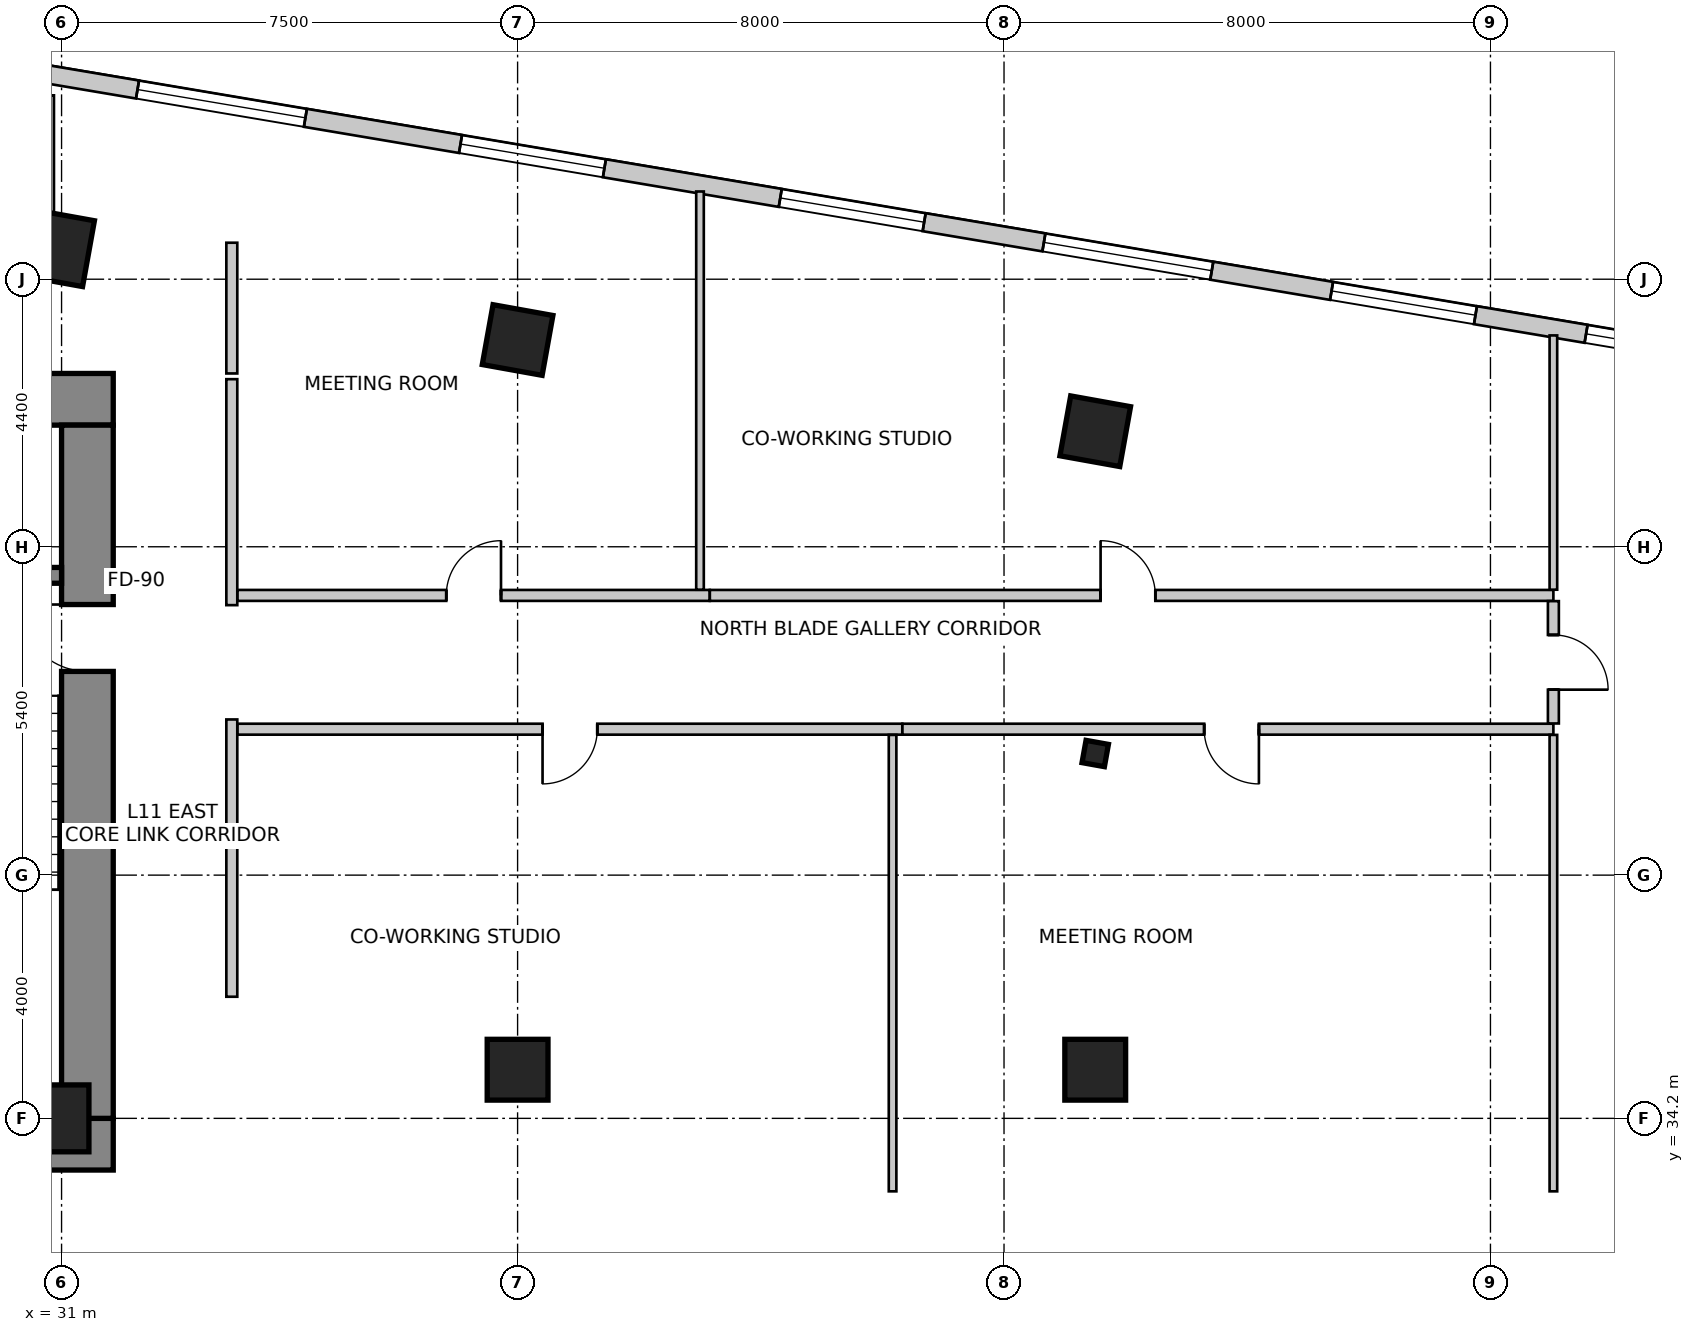
"""IFC4 building model, lengths in metres.
Left out: names, types, materials, properties, quantities, classifications, styles, units other than length and angle.
Written with IfcOpenShell. Run it as: python <this file> out.ifc"""

import sys

from ifc_helpers import new_model, si_unit, direction, frame, frame_2d, origin, origin_2d, place, context, subcontext, project, spatial, rectangle, i_section, extrude, source, transform, mapped, element, fill, save


model = new_model("IFC4")
c1 = context("Model", 3, precision=1e-05, world=origin(), true_north=direction((0.0, 1.0)))
c2 = subcontext(c1, "Body", "Model", "MODEL_VIEW")
j1 = project(units=[si_unit("LENGTHUNIT", "METRE"), si_unit("PLANEANGLEUNIT", "RADIAN")], contexts=[c1])
p1 = place(None, origin())
s1 = spatial("IfcSite", under=j1, at=p1, CompositionType="ELEMENT")
p2 = place(p1, origin())
s2 = spatial("IfcBuilding", under=s1, at=p2, CompositionType="ELEMENT")
p3 = place(p2, frame((0.0, 0.0, 47.0)))
s3 = spatial("IfcBuildingStorey", under=s2, at=p3, CompositionType="ELEMENT", Elevation=47.0)
p4 = place(p3, frame((15.75, 46.025, 0.0), z_axis=(0.0, 0.0, 1.0), x_axis=(1.0, 0.0, 0.0)))
e1 = element("IfcWall", 1, at=p4, inside=s3, PredefinedType="SHEAR", context=c2, shape_type="SweptSolid", body=[
    extrude(rectangle(XDim=16.1, YDim=0.85, at=frame_2d((8.05, 0.0))), origin(), (0.0, 0.0, 1.0), 4.0),
])
p5 = place(p3, frame((15.75, 33.775, 0.0), z_axis=(0.0, 0.0, 1.0), x_axis=(1.0, 0.0, 0.0)))
e2 = element("IfcWall", 2, at=p5, inside=s3, PredefinedType="SHEAR", context=c2, shape_type="SweptSolid", body=[
    extrude(rectangle(XDim=16.1, YDim=0.85, at=frame_2d((8.05, 0.0))), origin(), (0.0, 0.0, 1.0), 4.0),
])
m1 = source(origin(), c2, "Body", "SweptSolid", [
    extrude(rectangle(XDim=1.3, YDim=2.15, at=frame_2d((0.65, 1.075))), frame((0.0, 0.435, 0.0), z_axis=(0.0, -1.0, 0.0), x_axis=(1.0, 0.0, 0.0)), (0.0, 0.0, 1.0), 0.87),
])
p6 = place(p5, frame((10.18, 0.0, 0.0)))
e3 = element("IfcOpeningElement", 3, at=p6, cuts=e2, PredefinedType="OPENING", context=c2, shape_type="MappedRepresentation", body=[
    mapped(m1, transform((0.0, 0.0, 0.0), scale=1.0)),
])
p7 = place(p3, frame((31.425, 34.2, 0.0), z_axis=(0.0, 0.0, 1.0), x_axis=(0.0, 1.0, 0.0)))
e4 = element("IfcWall", 4, at=p7, inside=s3, PredefinedType="SHEAR", context=c2, shape_type="SweptSolid", body=[
    extrude(rectangle(XDim=11.4, YDim=0.85, at=frame_2d((5.7, 0.0))), origin(), (0.0, 0.0, 1.0), 4.0),
])
m2 = source(origin(), c2, "Body", "SweptSolid", [
    extrude(rectangle(XDim=1.1, YDim=2.15, at=frame_2d((0.55, 1.075))), frame((0.0, 0.435, 0.0), z_axis=(0.0, -1.0, 0.0), x_axis=(1.0, 0.0, 0.0)), (0.0, 0.0, 1.0), 0.87),
])
p8 = place(p7, frame((7.35, 0.0, 0.0)))
e5 = element("IfcOpeningElement", 5, at=p8, cuts=e4, PredefinedType="OPENING", context=c2, shape_type="MappedRepresentation", body=[
    mapped(m2, transform((0.0, 0.0, 0.0), scale=1.0)),
])
p9 = place(p3, frame((27.5, 43.13, 0.0), z_axis=(0.0, 0.0, 1.0), x_axis=(1.0, 0.0, 0.0)))
e6 = element("IfcWall", 6, at=p9, inside=s3, PredefinedType="SHEAR", context=c2, shape_type="SweptSolid", body=[
    extrude(rectangle(XDim=3.5, YDim=0.26, at=frame_2d((1.75, 0.0))), origin(), (0.0, 0.0, 1.0), 4.0),
])
m3 = source(origin(), c2, "Body", "SweptSolid", [
    extrude(rectangle(XDim=0.9, YDim=1.1, at=origin_2d()), origin(), (0.0, 0.0, 1.0), 4.0),
])
p10 = place(p3, frame((31.0, 48.5, 0.0), z_axis=(0.0, 0.0, 1.0), x_axis=(0.984195607969, -0.17708474032, 0.0)))
e7 = element("IfcColumn", 7, at=p10, inside=s3, PredefinedType="COLUMN", context=c2, shape_type="MappedRepresentation", body=[
    mapped(m3, transform((0.0, 0.0, 0.0), scale=1.0)),
])
m4 = source(origin(), c2, "Body", "SweptSolid", [
    extrude(rectangle(XDim=1.0, YDim=1.0, at=origin_2d()), origin(), (0.0, 0.0, 1.0), 4.0),
])
for number, where, z_axis, x_axis in (
    (8, (38.5, 47.0, 0.0), (0.0, 0.0, 1.0), (0.984, -0.177, 0.0)),
    (9, (48.0, 45.5, 0.0), (0.0, 0.0, 1.0), (0.984, -0.177, 0.0)),
):
    element("IfcColumn", number, at=place(p3, frame(where, z_axis=z_axis, x_axis=x_axis)), inside=s3, PredefinedType="COLUMN", context=c2, shape_type="MappedRepresentation", body=[
        mapped(m4, transform((0.0, 0.0, 0.0), scale=1.0)),
    ])
p11 = place(p3, frame((31.0, 34.2, 0.0), z_axis=(0.0, 0.0, 1.0), x_axis=(1.0, 0.0, 0.0)))
e10 = element("IfcColumn", 10, at=p11, inside=s3, PredefinedType="COLUMN", context=c2, shape_type="MappedRepresentation", body=[
    mapped(m3, transform((0.0, 0.0, 0.0), scale=1.0)),
])
for number, where, z_axis, x_axis in (
    (11, (38.5, 35.0, 0.0), (0.0, 0.0, 1.0), (1.0, 0.0, 0.0)),
    (12, (48.0, 35.0, 0.0), (0.0, 0.0, 1.0), (1.0, 0.0, 0.0)),
):
    element("IfcColumn", number, at=place(p3, frame(where, z_axis=z_axis, x_axis=x_axis)), inside=s3, PredefinedType="COLUMN", context=c2, shape_type="MappedRepresentation", body=[
        mapped(m4, transform((0.0, 0.0, 0.0), scale=1.0)),
    ])
m5 = source(origin(), c2, "Body", "SweptSolid", [
    extrude(i_section(OverallWidth=0.374, OverallDepth=0.372, WebThickness=0.016, FlangeThickness=0.026, FilletRadius=0.015, at=origin_2d()), origin(), (0.0, 0.0, 1.0), 4.0),
])
p12 = place(p3, frame((48.0, 40.2, 0.0), z_axis=(0.0, 0.0, 1.0), x_axis=(0.984195607969, -0.17708474032, 0.0)))
e13 = element("IfcColumn", 13, at=p12, inside=s3, PredefinedType="COLUMN", context=c2, shape_type="MappedRepresentation", body=[
    mapped(m5, transform((0.0, 0.0, 0.0), scale=1.0)),
])
p13 = place(p3, frame((58.761, 46.648, 0.0), z_axis=(0.0, 0.0, 1.0), x_axis=(-0.98607502735, 0.166301053624, 0.0)))
e14 = element("IfcWall", 14, at=p13, inside=s3, PredefinedType="SOLIDWALL", context=c2, shape_type="SweptSolid", body=[
    extrude(rectangle(XDim=37.397, YDim=0.3, at=frame_2d((18.699, 0.0))), origin(), (0.0, 0.0, 1.0), 3.75),
])
m6 = source(origin(), c2, "Body", "SweptSolid", [
    extrude(rectangle(XDim=2.1, YDim=2.0, at=frame_2d((1.05, 1.0))), frame((0.0, 0.16, 0.0), z_axis=(0.0, -1.0, 0.0), x_axis=(1.0, 0.0, 0.0)), (0.0, 0.0, 1.0), 0.32),
])
p14 = place(p13, frame((0.626, 0.0, 0.85)))
e15 = element("IfcOpeningElement", 15, at=p14, cuts=e14, PredefinedType="OPENING", context=c2, shape_type="MappedRepresentation", body=[
    mapped(m6, transform((0.0, 0.0, 0.0), scale=1.0)),
])
m7 = source(origin(), c2, "Body", "SweptSolid", [
    extrude(rectangle(XDim=2.4, YDim=2.2, at=frame_2d((1.2, 1.1))), frame((0.0, 0.16, 0.0), z_axis=(0.0, -1.0, 0.0), x_axis=(1.0, 0.0, 0.0)), (0.0, 0.0, 1.0), 0.32),
])
p15 = place(p13, frame((4.571, 0.0, 0.85)))
e16 = element("IfcOpeningElement", 16, at=p15, cuts=e14, PredefinedType="OPENING", context=c2, shape_type="MappedRepresentation", body=[
    mapped(m7, transform((0.0, 0.0, 0.0), scale=1.0)),
])
m8 = source(origin(), c2, "Body", "SweptSolid", [
    extrude(rectangle(XDim=2.8, YDim=2.4, at=frame_2d((1.4, 1.2))), frame((0.0, 0.16, 0.0), z_axis=(0.0, -1.0, 0.0), x_axis=(1.0, 0.0, 0.0)), (0.0, 0.0, 1.0), 0.32),
])
p16 = place(p13, frame((8.969, 0.0, 0.85)))
e17 = element("IfcOpeningElement", 17, at=p16, cuts=e14, PredefinedType="OPENING", context=c2, shape_type="MappedRepresentation", body=[
    mapped(m8, transform((0.0, 0.0, 0.0), scale=1.0)),
])
p17 = place(p13, frame((13.766, 0.0, 0.85)))
e18 = element("IfcOpeningElement", 18, at=p17, cuts=e14, PredefinedType="OPENING", context=c2, shape_type="MappedRepresentation", body=[
    mapped(m7, transform((0.0, 0.0, 0.0), scale=1.0)),
])
p18 = place(p13, frame((19.099, 0.0, 0.85)))
e19 = element("IfcOpeningElement", 19, at=p18, cuts=e14, PredefinedType="OPENING", context=c2, shape_type="MappedRepresentation", body=[
    mapped(m7, transform((0.0, 0.0, 0.0), scale=1.0)),
])
p19 = place(p13, frame((24.086, 0.0, 0.85)))
e20 = element("IfcOpeningElement", 20, at=p19, cuts=e14, PredefinedType="OPENING", context=c2, shape_type="MappedRepresentation", body=[
    mapped(m8, transform((0.0, 0.0, 0.0), scale=1.0)),
])
p20 = place(p13, frame((29.957, 0.0, 0.85)))
e21 = element("IfcOpeningElement", 21, at=p20, cuts=e14, PredefinedType="OPENING", context=c2, shape_type="MappedRepresentation", body=[
    mapped(m7, transform((0.0, 0.0, 0.0), scale=1.0)),
])
p21 = place(p13, frame((34.456, 0.0, 0.85)))
e22 = element("IfcOpeningElement", 22, at=p21, cuts=e14, PredefinedType="OPENING", context=c2, shape_type="MappedRepresentation", body=[
    mapped(m7, transform((0.0, 0.0, 0.0), scale=1.0)),
])
p22 = place(p3, frame((25.362, 48.6, 0.0), z_axis=(0.0, 0.0, 1.0), x_axis=(1.0, 0.0, 0.0)))
e23 = element("IfcWall", 23, at=p22, inside=s3, PredefinedType="PARTITIONING", context=c2, shape_type="SweptSolid", body=[
    extrude(rectangle(XDim=5.598, YDim=0.18, at=frame_2d((2.799, 0.0))), origin(), (0.0, 0.0, 1.0), 2.892),
])
m9 = source(origin(), c2, "Body", "SweptSolid", [
    extrude(rectangle(XDim=0.9, YDim=2.15, at=frame_2d((0.45, 1.075))), frame((0.0, 0.1, 0.0), z_axis=(0.0, -1.0, 0.0), x_axis=(1.0, 0.0, 0.0)), (0.0, 0.0, 1.0), 0.2),
])
p23 = place(p22, frame((2.349, 0.0, 0.0)))
e24 = element("IfcOpeningElement", 24, at=p23, cuts=e23, PredefinedType="OPENING", context=c2, shape_type="MappedRepresentation", body=[
    mapped(m9, transform((0.0, 0.0, 0.0), scale=1.0)),
])
p24 = place(p3, frame((33.8, 48.6, 0.0), z_axis=(0.0, 0.0, 1.0), x_axis=(0.0, -1.0, 0.0)))
e25 = element("IfcWall", 25, at=p24, inside=s3, PredefinedType="PARTITIONING", context=c2, shape_type="SweptSolid", body=[
    extrude(rectangle(XDim=2.15, YDim=0.18, at=frame_2d((1.075, 0.0))), origin(), (0.0, 0.0, 1.0), 2.892),
])
p25 = place(p3, frame((33.8, 40.76, 0.0), z_axis=(0.0, 0.0, 1.0), x_axis=(0.0, -1.0, 0.0)))
e26 = element("IfcWall", 26, at=p25, inside=s3, PredefinedType="PARTITIONING", context=c2, shape_type="SweptSolid", body=[
    extrude(rectangle(XDim=4.56, YDim=0.18, at=frame_2d((2.28, 0.0))), origin(), (0.0, 0.0, 1.0), 3.75),
])
p26 = place(p3, frame((33.8, 46.356, 0.0), z_axis=(0.0, 0.0, 1.0), x_axis=(0.0, -1.0, 0.0)))
e27 = element("IfcWall", 27, at=p26, inside=s3, PredefinedType="PARTITIONING", context=c2, shape_type="SweptSolid", body=[
    extrude(rectangle(XDim=3.716, YDim=0.18, at=frame_2d((1.858, 0.0))), origin(), (0.0, 0.0, 1.0), 3.322),
])
p27 = place(p3, frame((44.827, 40.6, 0.0), z_axis=(0.0, 0.0, 1.0), x_axis=(-1.0, 0.0, 0.0)))
e28 = element("IfcWall", 28, at=p27, inside=s3, PredefinedType="PARTITIONING", context=c2, shape_type="SweptSolid", body=[
    extrude(rectangle(XDim=10.933, YDim=0.18, at=frame_2d((5.466, 0.0))), origin(), (0.0, 0.0, 1.0), 3.125),
])
p28 = place(p27, frame((5.017, 0.0, 0.0)))
e29 = element("IfcOpeningElement", 29, at=p28, cuts=e28, PredefinedType="OPENING", context=c2, shape_type="MappedRepresentation", body=[
    mapped(m9, transform((0.0, 0.0, 0.0), scale=1.0)),
])
p29 = place(p3, frame((55.535, 40.6, 0.0), z_axis=(0.0, 0.0, 1.0), x_axis=(-1.0, 0.0, 0.0)))
e30 = element("IfcWall", 30, at=p29, inside=s3, PredefinedType="PARTITIONING", context=c2, shape_type="SweptSolid", body=[
    extrude(rectangle(XDim=10.706, YDim=0.18, at=frame_2d((5.353, 0.0))), origin(), (0.0, 0.0, 1.0), 3.125),
])
p30 = place(p29, frame((4.843, 0.0, 0.0)))
e31 = element("IfcOpeningElement", 31, at=p30, cuts=e30, PredefinedType="OPENING", context=c2, shape_type="MappedRepresentation", body=[
    mapped(m9, transform((0.0, 0.0, 0.0), scale=1.0)),
])
p31 = place(p3, frame((33.894, 42.8, 0.0), z_axis=(0.0, 0.0, 1.0), x_axis=(1.0, 0.0, 0.0)))
e32 = element("IfcWall", 32, at=p31, inside=s3, PredefinedType="PARTITIONING", context=c2, shape_type="SweptSolid", body=[
    extrude(rectangle(XDim=7.766, YDim=0.18, at=frame_2d((3.883, 0.0))), origin(), (0.0, 0.0, 1.0), 3.125),
])
p32 = place(p31, frame((3.433, 0.0, 0.0)))
e33 = element("IfcOpeningElement", 33, at=p32, cuts=e32, PredefinedType="OPENING", context=c2, shape_type="MappedRepresentation", body=[
    mapped(m9, transform((0.0, 0.0, 0.0), scale=1.0)),
])
p33 = place(p3, frame((41.662, 42.8, 0.0), z_axis=(0.0, 0.0, 1.0), x_axis=(1.0, 0.0, 0.0)))
e34 = element("IfcWall", 34, at=p33, inside=s3, PredefinedType="PARTITIONING", context=c2, shape_type="SweptSolid", body=[
    extrude(rectangle(XDim=13.873, YDim=0.18, at=frame_2d((6.937, 0.0))), origin(), (0.0, 0.0, 1.0), 3.125),
])
p34 = place(p33, frame((6.426, 0.0, 0.0)))
e35 = element("IfcOpeningElement", 35, at=p34, cuts=e34, PredefinedType="OPENING", context=c2, shape_type="MappedRepresentation", body=[
    mapped(m9, transform((0.0, 0.0, 0.0), scale=1.0)),
])
p35 = place(p3, frame((55.535, 42.706, 0.0), z_axis=(0.0, 0.0, 1.0), x_axis=(0.0, -1.0, 0.0)))
e36 = element("IfcWall", 36, at=p35, inside=s3, PredefinedType="PARTITIONING", context=c2, shape_type="SweptSolid", body=[
    extrude(rectangle(XDim=2.012, YDim=0.18, at=frame_2d((1.006, 0.0))), origin(), (0.0, 0.0, 1.0), 3.75),
])
p36 = place(p35, frame((0.556, 0.0, 0.0)))
e37 = element("IfcOpeningElement", 37, at=p36, cuts=e36, PredefinedType="OPENING", context=c2, shape_type="MappedRepresentation", body=[
    mapped(m9, transform((0.0, 0.0, 0.0), scale=1.0)),
])
p37 = place(p3, frame((44.667, 40.506, 0.0), z_axis=(0.0, 0.0, 1.0), x_axis=(0.0, -1.0, 0.0)))
e38 = element("IfcWall", 38, at=p37, inside=s3, PredefinedType="PARTITIONING", context=c2, shape_type="SweptSolid", body=[
    extrude(rectangle(XDim=7.506, YDim=0.125, at=frame_2d((3.753, 0.0))), origin(), (0.0, 0.0, 1.0), 2.892),
])
p38 = place(p3, frame((55.535, 40.506, 0.0), z_axis=(0.0, 0.0, 1.0), x_axis=(0.0, -1.0, 0.0)))
e39 = element("IfcWall", 39, at=p38, inside=s3, PredefinedType="PARTITIONING", context=c2, shape_type="SweptSolid", body=[
    extrude(rectangle(XDim=7.506, YDim=0.125, at=frame_2d((3.753, 0.0))), origin(), (0.0, 0.0, 1.0), 3.75),
])
p39 = place(p3, frame((41.5, 49.443, 0.0), z_axis=(0.0, 0.0, 1.0), x_axis=(0.0, -1.0, 0.0)))
e40 = element("IfcWall", 40, at=p39, inside=s3, PredefinedType="PARTITIONING", context=c2, shape_type="SweptSolid", body=[
    extrude(rectangle(XDim=6.549, YDim=0.125, at=frame_2d((3.274, 0.0))), origin(), (0.0, 0.0, 1.0), 2.892),
])
p40 = place(p3, frame((55.535, 47.076, 0.0), z_axis=(0.0, 0.0, 1.0), x_axis=(0.0, -1.0, 0.0)))
e41 = element("IfcWall", 41, at=p40, inside=s3, PredefinedType="PARTITIONING", context=c2, shape_type="SweptSolid", body=[
    extrude(rectangle(XDim=4.182, YDim=0.125, at=frame_2d((2.091, 0.0))), origin(), (0.0, 0.0, 1.0), 3.75),
])
p41 = place(p3, frame((30.8, 51.024, 0.0), z_axis=(0.0, 0.0, 1.0), x_axis=(0.0, -1.0, 0.0)))
e42 = element("IfcWall", 42, at=p41, inside=s3, PredefinedType="PARTITIONING", context=c2, shape_type="SweptSolid", body=[
    extrude(rectangle(XDim=2.204, YDim=0.15, at=frame_2d((1.102, 0.0))), origin(), (0.0, 0.0, 1.0), 3.75),
])
m10 = source(origin(), c2, "Body", "SweptSolid", [
    extrude(rectangle(XDim=2.1, YDim=2.0, at=frame_2d((1.05, 1.0))), frame((0.0, -0.015, 0.0), z_axis=(0.0, -1.0, 0.0), x_axis=(1.0, 0.0, 0.0)), (0.0, 0.0, 1.0), 0.06),
])
p42 = place(p14, origin())
e43 = element("IfcWindow", 43, at=p42, inside=s3, PartitioningType="SINGLE_PANEL", PredefinedType="WINDOW", context=c2, shape_type="MappedRepresentation", body=[
    mapped(m10, transform((0.0, 0.0, 0.0), scale=1.0)),
])
fill(e15, e43)
m11 = source(origin(), c2, "Body", "SweptSolid", [
    extrude(rectangle(XDim=2.4, YDim=2.2, at=frame_2d((1.2, 1.1))), frame((0.0, -0.015, 0.0), z_axis=(0.0, -1.0, 0.0), x_axis=(1.0, 0.0, 0.0)), (0.0, 0.0, 1.0), 0.06),
])
p43 = place(p15, origin())
e44 = element("IfcWindow", 44, at=p43, inside=s3, PartitioningType="SINGLE_PANEL", PredefinedType="WINDOW", context=c2, shape_type="MappedRepresentation", body=[
    mapped(m11, transform((0.0, 0.0, 0.0), scale=1.0)),
])
fill(e16, e44)
m12 = source(origin(), c2, "Body", "SweptSolid", [
    extrude(rectangle(XDim=2.8, YDim=2.4, at=frame_2d((1.4, 1.2))), frame((0.0, -0.015, 0.0), z_axis=(0.0, -1.0, 0.0), x_axis=(1.0, 0.0, 0.0)), (0.0, 0.0, 1.0), 0.06),
])
p44 = place(p16, origin())
e45 = element("IfcWindow", 45, at=p44, inside=s3, PartitioningType="SINGLE_PANEL", PredefinedType="WINDOW", context=c2, shape_type="MappedRepresentation", body=[
    mapped(m12, transform((0.0, 0.0, 0.0), scale=1.0)),
])
fill(e17, e45)
p45 = place(p17, origin())
e46 = element("IfcWindow", 46, at=p45, inside=s3, PartitioningType="SINGLE_PANEL", PredefinedType="WINDOW", context=c2, shape_type="MappedRepresentation", body=[
    mapped(m11, transform((0.0, 0.0, 0.0), scale=1.0)),
])
fill(e18, e46)
p46 = place(p18, origin())
e47 = element("IfcWindow", 47, at=p46, inside=s3, PartitioningType="SINGLE_PANEL", PredefinedType="WINDOW", context=c2, shape_type="MappedRepresentation", body=[
    mapped(m11, transform((0.0, 0.0, 0.0), scale=1.0)),
])
fill(e19, e47)
p47 = place(p19, origin())
e48 = element("IfcWindow", 48, at=p47, inside=s3, PartitioningType="SINGLE_PANEL", PredefinedType="WINDOW", context=c2, shape_type="MappedRepresentation", body=[
    mapped(m12, transform((0.0, 0.0, 0.0), scale=1.0)),
])
fill(e20, e48)
m13 = source(origin(), c2, "Body", "SweptSolid", [
    extrude(rectangle(XDim=1.1, YDim=2.15, at=frame_2d((0.55, 1.075))), frame((0.0, 0.025, 0.0), z_axis=(0.0, -1.0, 0.0), x_axis=(1.0, 0.0, 0.0)), (0.0, 0.0, 1.0), 0.05),
])
p48 = place(p8, origin())
e49 = element("IfcDoor", 49, at=p48, inside=s3, OperationType="SINGLE_SWING_RIGHT", PredefinedType="DOOR", context=c2, shape_type="MappedRepresentation", body=[
    mapped(m13, transform((0.0, 0.0, 0.0), scale=1.0)),
])
fill(e5, e49)
m14 = source(origin(), c2, "Body", "SweptSolid", [
    extrude(rectangle(XDim=0.9, YDim=2.15, at=frame_2d((0.45, 1.075))), frame((0.0, 0.025, 0.0), z_axis=(0.0, -1.0, 0.0), x_axis=(1.0, 0.0, 0.0)), (0.0, 0.0, 1.0), 0.05),
])
p49 = place(p28, origin())
e50 = element("IfcDoor", 50, at=p49, inside=s3, OperationType="SINGLE_SWING_RIGHT", PredefinedType="DOOR", context=c2, shape_type="MappedRepresentation", body=[
    mapped(m14, transform((0.0, 0.0, 0.0), scale=1.0)),
])
fill(e29, e50)
p50 = place(p30, origin())
e51 = element("IfcDoor", 51, at=p50, inside=s3, OperationType="SINGLE_SWING_LEFT", PredefinedType="DOOR", context=c2, shape_type="MappedRepresentation", body=[
    mapped(m14, transform((0.0, 0.0, 0.0), scale=1.0)),
])
fill(e31, e51)
p51 = place(p32, origin())
e52 = element("IfcDoor", 52, at=p51, inside=s3, OperationType="SINGLE_SWING_RIGHT", PredefinedType="DOOR", context=c2, shape_type="MappedRepresentation", body=[
    mapped(m14, transform((0.0, 0.0, 0.0), scale=1.0)),
])
fill(e33, e52)
p52 = place(p34, origin())
e53 = element("IfcDoor", 53, at=p52, inside=s3, OperationType="SINGLE_SWING_LEFT", PredefinedType="DOOR", context=c2, shape_type="MappedRepresentation", body=[
    mapped(m14, transform((0.0, 0.0, 0.0), scale=1.0)),
])
fill(e35, e53)
p53 = place(p36, origin())
e54 = element("IfcDoor", 54, at=p53, inside=s3, OperationType="SINGLE_SWING_RIGHT", PredefinedType="DOOR", context=c2, shape_type="MappedRepresentation", body=[
    mapped(m14, transform((0.0, 0.0, 0.0), scale=1.0)),
])
fill(e37, e54)
save(model, sys.argv[1])
